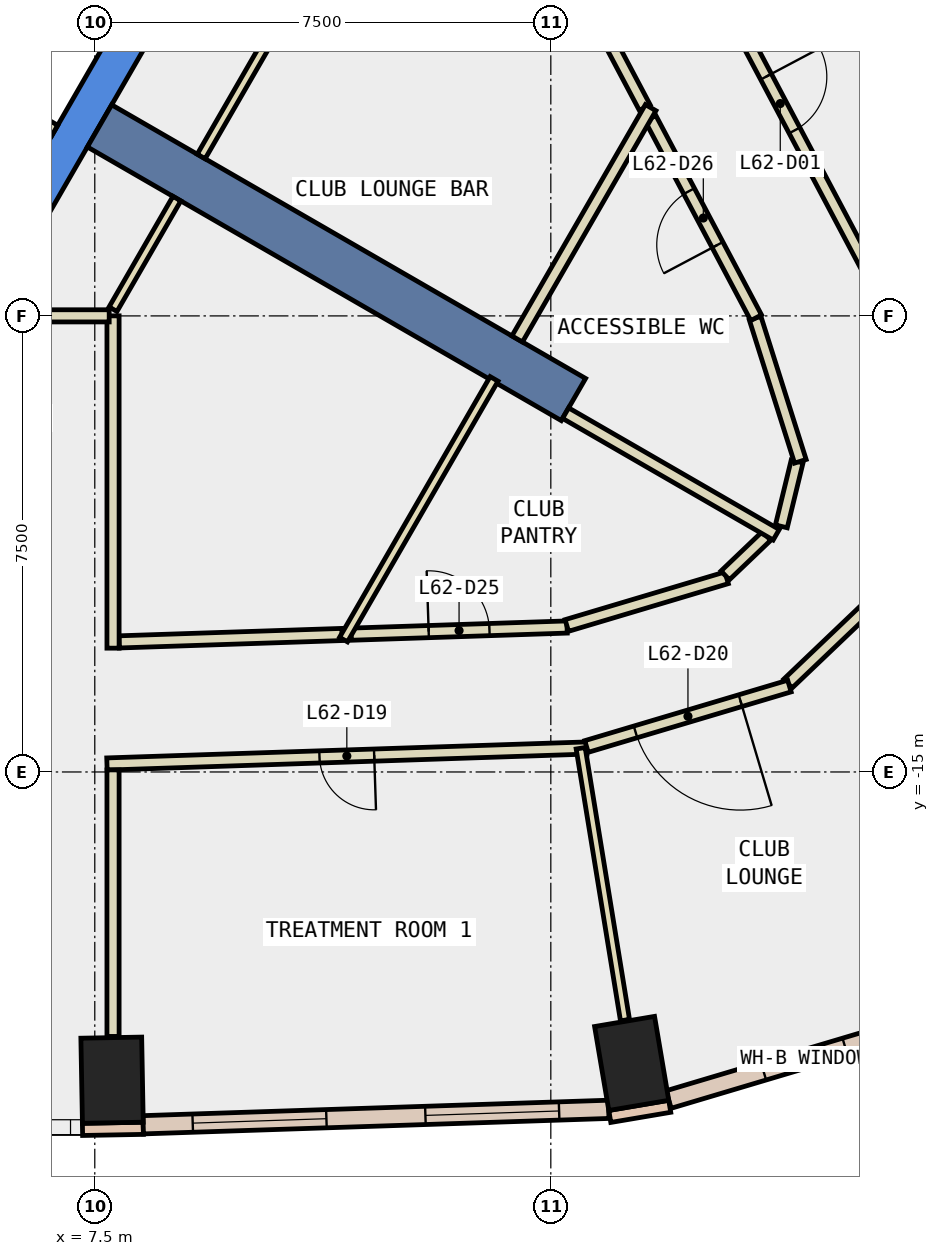
"""IFC4 building model, lengths in metres.
Left out: names, types, materials, properties, quantities, classifications, styles, units other than length and angle.
Written with IfcOpenShell. Run it as: python <this file> out.ifc"""

import sys

from ifc_helpers import new_model, si_unit, direction, frame, frame_2d, origin, origin_2d, place, context, subcontext, project, spatial, polyline, rectangle, outline, extrude, element, fill, save


model = new_model("IFC4")
c1 = context("Model", 3, precision=1e-05, world=origin(), true_north=direction((0.0, 1.0)))
c2 = subcontext(c1, "Body", "Model", "MODEL_VIEW")
j1 = project(units=[si_unit("LENGTHUNIT", "METRE"), si_unit("PLANEANGLEUNIT", "RADIAN")], contexts=[c1])
p1 = place(None, origin())
s1 = spatial("IfcSite", under=j1, at=p1, CompositionType="ELEMENT")
p2 = place(p1, origin())
s2 = spatial("IfcBuilding", under=s1, at=p2, CompositionType="ELEMENT")
p3 = place(p2, frame((0.0, 0.0, 270.2)))
s3 = spatial("IfcBuildingStorey", under=s2, at=p3, CompositionType="ELEMENT", Elevation=270.2)
for number, where, z_axis, x_axis in (
    (1, (7.784, -20.069, -0.34), (0.0, 0.0, 1.0), (1.0, 0.018, 0.0)),
    (2, (16.33, -19.793, -0.34), (0.0, 0.0, 1.0), (0.986, 0.167, 0.0)),
):
    element("IfcColumn", number, at=place(p3, frame(where, z_axis=z_axis, x_axis=x_axis)), inside=s3, PredefinedType="COLUMN", context=c2, shape_type="SweptSolid", body=[
        extrude(rectangle(XDim=1.0, YDim=1.4, at=origin_2d()), origin(), (0.0, 0.0, 1.0), 3.6),
    ])
p4 = place(p3, frame((0.0, 0.0, -0.34)))
e3 = element("IfcWall", 3, at=p4, inside=s3, PredefinedType="SHEAR", context=c2, shape_type="SweptSolid", body=[
    extrude(outline(polyline([(5.774, -7.5), (11.547, 2.5), (10.854, 2.5), (5.427, -6.9), (5.774, -7.5)])), origin(), (0.0, 0.0, 1.0), 3.6),
])
p5 = place(p3, frame((7.578, -4.375, -0.34), z_axis=(0.0, 0.0, 1.0), x_axis=(0.866024315419, -0.5000018851, 0.0)))
e4 = element("IfcWall", 4, at=p5, inside=s3, PredefinedType="SHEAR", context=c2, shape_type="SweptSolid", body=[
    extrude(rectangle(XDim=9.0, YDim=0.8, at=frame_2d((4.5, 0.0))), origin(), (0.0, 0.0, 1.0), 3.6),
])
for number, where, z_axis, x_axis in (
    (5, (7.298, -20.878, 0.0), (0.0, 0.0, 1.0), (1.0, 0.018, 0.0)),
    (6, (15.97, -20.665, 0.0), (0.0, 0.0, 1.0), (0.986, 0.167, 0.0)),
):
    element("IfcWall", number, at=place(p3, frame(where, z_axis=z_axis, x_axis=x_axis)), inside=s3, PredefinedType="STANDARD", context=c2, shape_type="SweptSolid", body=[
        extrude(rectangle(XDim=1.0, YDim=0.2, at=frame_2d((0.5, 0.0))), origin(), (0.0, 0.0, 1.0), 3.26),
    ])
p6 = place(p3, frame((8.296, -20.802, 0.0), z_axis=(0.0, 0.0, 1.0), x_axis=(0.999450376985, 0.033150323459, 0.0)))
e7 = element("IfcWall", 7, at=p6, inside=s3, PredefinedType="STANDARD", context=c2, shape_type="SweptSolid", body=[
    extrude(rectangle(XDim=7.659, YDim=0.3, at=frame_2d((3.83, 0.0))), origin(), (0.0, 0.0, 1.0), 3.26),
])
p7 = place(p6, frame((0.815, 0.0, 0.9)))
e8 = element("IfcOpeningElement", 8, at=p7, cuts=e7, PredefinedType="OPENING", context=c2, shape_type="SweptSolid", body=[
    extrude(rectangle(XDim=2.2, YDim=2.0, at=frame_2d((1.1, 1.0))), frame((0.0, 0.16, 0.0), z_axis=(0.0, -1.0, 0.0), x_axis=(1.0, 0.0, 0.0)), (0.0, 0.0, 1.0), 0.32),
])
p8 = place(p6, frame((4.644, 0.0, 0.9)))
e9 = element("IfcOpeningElement", 9, at=p8, cuts=e7, PredefinedType="OPENING", context=c2, shape_type="SweptSolid", body=[
    extrude(rectangle(XDim=2.2, YDim=2.0, at=frame_2d((1.1, 1.0))), frame((0.0, 0.16, 0.0), z_axis=(0.0, -1.0, 0.0), x_axis=(1.0, 0.0, 0.0)), (0.0, 0.0, 1.0), 0.32),
])
p9 = place(p3, frame((16.937, -20.387, 0.0), z_axis=(0.0, 0.0, 1.0), x_axis=(0.958361270465, 0.285558532131, 0.0)))
e10 = element("IfcWall", 10, at=p9, inside=s3, PredefinedType="STANDARD", context=c2, shape_type="SweptSolid", body=[
    extrude(rectangle(XDim=4.658, YDim=0.3, at=frame_2d((2.329, 0.0))), origin(), (0.0, 0.0, 1.0), 3.26),
])
p10 = place(p9, frame((1.629, 0.0, 0.9)))
e11 = element("IfcOpeningElement", 11, at=p10, cuts=e10, PredefinedType="OPENING", context=c2, shape_type="SweptSolid", body=[
    extrude(rectangle(XDim=1.4, YDim=2.0, at=frame_2d((0.7, 1.0))), frame((0.0, 0.16, 0.0), z_axis=(0.0, -1.0, 0.0), x_axis=(1.0, 0.0, 0.0)), (0.0, 0.0, 1.0), 0.32),
])
p11 = place(p3, frame((7.9, -12.861, 0.0), z_axis=(0.0, 0.0, 1.0), x_axis=(0.999446088303, 0.033279371614, 0.0)))
e12 = element("IfcWall", 12, at=p11, inside=s3, PredefinedType="PARTITIONING", context=c2, shape_type="SweptSolid", body=[
    extrude(rectangle(XDim=3.668, YDim=0.2, at=frame_2d((1.834, 0.0))), origin(), (0.0, 0.0, 1.0), 3.26),
])
p12 = place(p3, frame((16.545, -4.074, 0.0), z_axis=(0.0, 0.0, 1.0), x_axis=(-0.468321873419, 0.883557934081, 0.0)))
e13 = element("IfcWall", 13, at=p12, inside=s3, PredefinedType="PARTITIONING", context=c2, shape_type="SweptSolid", body=[
    extrude(rectangle(XDim=2.093, YDim=0.2, at=frame_2d((1.046, 0.0))), origin(), (0.0, 0.0, 1.0), 3.26),
])
p13 = place(p3, frame((11.716, -12.734, 0.0), z_axis=(0.0, 0.0, 1.0), x_axis=(0.999449093602, 0.03318899362, 0.0)))
e14 = element("IfcWall", 14, at=p13, inside=s3, PredefinedType="PARTITIONING", context=c2, shape_type="SweptSolid", body=[
    extrude(rectangle(XDim=3.553, YDim=0.2, at=frame_2d((1.776, 0.0))), origin(), (0.0, 0.0, 1.0), 3.26),
])
p14 = place(p13, frame((1.276, 0.0, 0.0)))
e15 = element("IfcOpeningElement", 15, at=p14, cuts=e14, PredefinedType="OPENING", context=c2, shape_type="SweptSolid", body=[
    extrude(rectangle(XDim=1.0, YDim=2.1, at=frame_2d((0.5, 1.05))), frame((0.0, 0.11, 0.0), z_axis=(0.0, -1.0, 0.0), x_axis=(1.0, 0.0, 0.0)), (0.0, 0.0, 1.0), 0.22),
])
p15 = place(p3, frame((15.263, -12.591, 0.0), z_axis=(0.0, 0.0, 1.0), x_axis=(0.958253964342, 0.285918414628, 0.0)))
e16 = element("IfcWall", 16, at=p15, inside=s3, PredefinedType="PARTITIONING", context=c2, shape_type="SweptSolid", body=[
    extrude(rectangle(XDim=2.743, YDim=0.2, at=frame_2d((1.371, 0.0))), origin(), (0.0, 0.0, 1.0), 3.26),
])
p16 = place(p3, frame((17.868, -11.767, 0.0), z_axis=(0.0, 0.0, 1.0), x_axis=(0.723402701671, 0.690426340181, 0.0)))
e17 = element("IfcWall", 17, at=p16, inside=s3, PredefinedType="PARTITIONING", context=c2, shape_type="SweptSolid", body=[
    extrude(rectangle(XDim=0.94, YDim=0.2, at=frame_2d((0.47, 0.0))), origin(), (0.0, 0.0, 1.0), 3.26),
])
p17 = place(p3, frame((18.791, -10.961, 0.0), z_axis=(0.0, 0.0, 1.0), x_axis=(0.236572634589, 0.971613806285, 0.0)))
e18 = element("IfcWall", 18, at=p17, inside=s3, PredefinedType="PARTITIONING", context=c2, shape_type="SweptSolid", body=[
    extrude(rectangle(XDim=1.099, YDim=0.2, at=frame_2d((0.55, 0.0))), origin(), (0.0, 0.0, 1.0), 3.26),
])
p18 = place(p3, frame((19.104, -9.891, 0.0), z_axis=(0.0, 0.0, 1.0), x_axis=(-0.301325410186, 0.953521366922, 0.0)))
e19 = element("IfcWall", 19, at=p18, inside=s3, PredefinedType="PARTITIONING", context=c2, shape_type="SweptSolid", body=[
    extrude(rectangle(XDim=2.469, YDim=0.2, at=frame_2d((1.234, 0.0))), origin(), (0.0, 0.0, 1.0), 3.26),
])
p19 = place(p3, frame((18.377, -7.53, 0.0), z_axis=(0.0, 0.0, 1.0), x_axis=(-0.468214048123, 0.883615077474, 0.0)))
e20 = element("IfcWall", 20, at=p19, inside=s3, PredefinedType="PARTITIONING", context=c2, shape_type="SweptSolid", body=[
    extrude(rectangle(XDim=3.712, YDim=0.2, at=frame_2d((1.856, 0.0))), origin(), (0.0, 0.0, 1.0), 3.26),
])
p20 = place(p19, frame((1.356, 0.0, 0.0)))
e21 = element("IfcOpeningElement", 21, at=p20, cuts=e20, PredefinedType="OPENING", context=c2, shape_type="SweptSolid", body=[
    extrude(rectangle(XDim=1.0, YDim=2.1, at=frame_2d((0.5, 1.05))), frame((0.0, 0.11, 0.0), z_axis=(0.0, -1.0, 0.0), x_axis=(1.0, 0.0, 0.0)), (0.0, 0.0, 1.0), 0.22),
])
p21 = place(p3, frame((15.591, -14.606, 0.0), z_axis=(0.0, 0.0, 1.0), x_axis=(-0.999445318732, -0.03330247535, 0.0)))
e22 = element("IfcWall", 22, at=p21, inside=s3, PredefinedType="PARTITIONING", context=c2, shape_type="SweptSolid", body=[
    extrude(rectangle(XDim=7.896, YDim=0.2, at=frame_2d((3.948, 0.0))), origin(), (0.0, 0.0, 1.0), 3.26),
])
p22 = place(p21, frame((3.498, 0.0, 0.0)))
e23 = element("IfcOpeningElement", 23, at=p22, cuts=e22, PredefinedType="OPENING", context=c2, shape_type="SweptSolid", body=[
    extrude(rectangle(XDim=0.9, YDim=2.1, at=frame_2d((0.45, 1.05))), frame((0.0, 0.11, 0.0), z_axis=(0.0, -1.0, 0.0), x_axis=(1.0, 0.0, 0.0)), (0.0, 0.0, 1.0), 0.22),
])
p23 = place(p3, frame((20.692, -11.837, 0.0), z_axis=(0.0, 0.0, 1.0), x_axis=(-0.723668833869, -0.690147389248, 0.0)))
e24 = element("IfcWall", 24, at=p23, inside=s3, PredefinedType="PARTITIONING", context=c2, shape_type="SweptSolid", body=[
    extrude(rectangle(XDim=2.476, YDim=0.2, at=frame_2d((1.238, 0.0))), origin(), (0.0, 0.0, 1.0), 3.26),
])
p24 = place(p3, frame((18.924, -13.587, 0.0), z_axis=(0.0, 0.0, 1.0), x_axis=(-0.958378336681, -0.285501250052, 0.0)))
e25 = element("IfcWall", 25, at=p24, inside=s3, PredefinedType="PARTITIONING", context=c2, shape_type="SweptSolid", body=[
    extrude(rectangle(XDim=3.482, YDim=0.2, at=frame_2d((1.741, 0.0))), origin(), (0.0, 0.0, 1.0), 3.26),
])
p25 = place(p24, frame((0.841, 0.0, 0.0)))
e26 = element("IfcOpeningElement", 26, at=p25, cuts=e25, PredefinedType="OPENING", context=c2, shape_type="SweptSolid", body=[
    extrude(rectangle(XDim=1.8, YDim=2.1, at=frame_2d((0.9, 1.05))), frame((0.0, 0.11, 0.0), z_axis=(0.0, -1.0, 0.0), x_axis=(1.0, 0.0, 0.0)), (0.0, 0.0, 1.0), 0.22),
])
p26 = place(p3, frame((17.318, -1.262, 0.0), z_axis=(0.0, 0.0, 1.0), x_axis=(0.468313568794, -0.883562335822, 0.0)))
e27 = element("IfcWall", 27, at=p26, inside=s3, PredefinedType="PARTITIONING", context=c2, shape_type="SweptSolid", body=[
    extrude(rectangle(XDim=6.216, YDim=0.2, at=frame_2d((3.108, 0.0))), origin(), (0.0, 0.0, 1.0), 3.26),
])
p27 = place(p26, frame((2.608, 0.0, 0.0)))
e28 = element("IfcOpeningElement", 28, at=p27, cuts=e27, PredefinedType="OPENING", context=c2, shape_type="SweptSolid", body=[
    extrude(rectangle(XDim=1.0, YDim=2.1, at=frame_2d((0.5, 1.05))), frame((0.0, 0.11, 0.0), z_axis=(0.0, -1.0, 0.0), x_axis=(1.0, 0.0, 0.0)), (0.0, 0.0, 1.0), 0.22),
])
p28 = place(p3, frame((5.751, -3.938, 0.0), z_axis=(0.0, 0.0, 1.0), x_axis=(0.500034260056, 0.866005622828, 0.0)))
e29 = element("IfcWall", 29, at=p28, inside=s3, PredefinedType="PARTITIONING", context=c2, shape_type="SweptSolid", body=[
    extrude(rectangle(XDim=5.399, YDim=0.2, at=frame_2d((2.7, 0.0))), origin(), (0.0, 0.0, 1.0), 3.26),
])
p29 = place(p3, frame((6.841, -4.452, 0.0), z_axis=(0.0, 0.0, 1.0), x_axis=(-0.86621513555, 0.499671230855, 0.0)))
e30 = element("IfcWall", 30, at=p29, inside=s3, PredefinedType="PARTITIONING", context=c2, shape_type="SweptSolid", body=[
    extrude(rectangle(XDim=1.1, YDim=0.2, at=frame_2d((0.55, 0.0))), origin(), (0.0, 0.0, 1.0), 3.26),
])
p30 = place(p3, frame((7.8, -7.39, 0.0), z_axis=(0.0, 0.0, 1.0), x_axis=(0.499977374825, 0.866038466041, 0.0)))
e31 = element("IfcWall", 31, at=p30, inside=s3, PredefinedType="PARTITIONING", context=c2, shape_type="SweptSolid", body=[
    extrude(rectangle(XDim=2.1, YDim=0.15, at=frame_2d((1.05, 0.0))), origin(), (0.0, 0.0, 1.0), 3.26),
])
p31 = place(p3, frame((7.8, -7.499, 0.0), z_axis=(0.0, 0.0, 1.0), x_axis=(0.0, -1.0, 0.0)))
e32 = element("IfcWall", 32, at=p31, inside=s3, PredefinedType="PARTITIONING", context=c2, shape_type="SweptSolid", body=[
    extrude(rectangle(XDim=5.465, YDim=0.2, at=frame_2d((2.732, 0.0))), origin(), (0.0, 0.0, 1.0), 3.26),
])
p32 = place(p3, frame((7.8, -14.966, 0.0), z_axis=(0.0, 0.0, 1.0), x_axis=(0.0, -1.0, 0.0)))
e33 = element("IfcWall", 33, at=p32, inside=s3, PredefinedType="PARTITIONING", context=c2, shape_type="SweptSolid", body=[
    extrude(rectangle(XDim=4.383, YDim=0.2, at=frame_2d((2.191, 0.0))), origin(), (0.0, 0.0, 1.0), 3.26),
])
p33 = place(p3, frame((14.067, -8.536, 0.0), z_axis=(0.0, 0.0, 1.0), x_axis=(-0.500100941679, -0.865967117235, 0.0)))
e34 = element("IfcWall", 34, at=p33, inside=s3, PredefinedType="PARTITIONING", context=c2, shape_type="SweptSolid", body=[
    extrude(rectangle(XDim=4.951, YDim=0.15, at=frame_2d((2.475, 0.0))), origin(), (0.0, 0.0, 1.0), 3.26),
])
p34 = place(p3, frame((16.642, -4.075, 0.0), z_axis=(0.0, 0.0, 1.0), x_axis=(-0.49980426207, -0.866138383641, 0.0)))
e35 = element("IfcWall", 35, at=p34, inside=s3, PredefinedType="PARTITIONING", context=c2, shape_type="SweptSolid", body=[
    extrude(rectangle(XDim=4.392, YDim=0.2, at=frame_2d((2.196, 0.0))), origin(), (0.0, 0.0, 1.0), 3.26),
])
p35 = place(p3, frame((15.243, -9.099, 0.0), z_axis=(0.0, 0.0, 1.0), x_axis=(0.866026010844, -0.49999894854, 0.0)))
e36 = element("IfcWall", 36, at=p35, inside=s3, PredefinedType="PARTITIONING", context=c2, shape_type="SweptSolid", body=[
    extrude(rectangle(XDim=4.0, YDim=0.2, at=frame_2d((2.0, 0.0))), origin(), (0.0, 0.0, 1.0), 3.26),
])
p36 = place(p3, frame((15.491, -14.61, 0.0), z_axis=(0.0, 0.0, 1.0), x_axis=(0.160928343418, -0.986966092774, 0.0)))
e37 = element("IfcWall", 37, at=p36, inside=s3, PredefinedType="PARTITIONING", context=c2, shape_type="SweptSolid", body=[
    extrude(rectangle(XDim=4.53, YDim=0.15, at=frame_2d((2.265, 0.0))), origin(), (0.0, 0.0, 1.0), 3.26),
])
p37 = place(p3, frame((9.25, -4.878, 0.0), z_axis=(0.0, 0.0, 1.0), x_axis=(0.499982416899, 0.866035555154, 0.0)))
e38 = element("IfcWall", 38, at=p37, inside=s3, PredefinedType="PARTITIONING", context=c2, shape_type="SweptSolid", body=[
    extrude(rectangle(XDim=8.048, YDim=0.15, at=frame_2d((4.024, 0.0))), origin(), (0.0, 0.0, 1.0), 3.26),
])
p38 = place(p3, frame((5.944, -7.499, 0.0), z_axis=(0.0, 0.0, 1.0), x_axis=(1.0, 0.0, 0.0)))
e39 = element("IfcWall", 39, at=p38, inside=s3, PredefinedType="PARTITIONING", context=c2, shape_type="SweptSolid", body=[
    extrude(rectangle(XDim=1.793, YDim=0.2, at=frame_2d((0.896, 0.0))), origin(), (0.0, 0.0, 1.0), 3.26),
])
p39 = place(p3, frame((5.492, -3.788, 0.0), z_axis=(0.0, 0.0, 1.0), x_axis=(0.500034260056, 0.866005622828, 0.0)))
e40 = element("IfcWall", 40, at=p39, inside=s3, PredefinedType="STANDARD", context=c2, shape_type="SweptSolid", body=[
    extrude(rectangle(XDim=5.399, YDim=0.2, at=frame_2d((2.7, 0.0))), origin(), (0.0, 0.0, 1.0), 3.26),
])
p40 = place(p7, origin())
e41 = element("IfcWindow", 41, at=p40, inside=s3, PartitioningType="SINGLE_PANEL", PredefinedType="WINDOW", context=c2, shape_type="SweptSolid", body=[
    extrude(rectangle(XDim=2.2, YDim=2.0, at=frame_2d((1.1, 1.0))), frame((0.0, 0.03, 0.0), z_axis=(0.0, -1.0, 0.0), x_axis=(1.0, 0.0, 0.0)), (0.0, 0.0, 1.0), 0.06),
])
fill(e8, e41)
p41 = place(p8, origin())
e42 = element("IfcWindow", 42, at=p41, inside=s3, PartitioningType="SINGLE_PANEL", PredefinedType="WINDOW", context=c2, shape_type="SweptSolid", body=[
    extrude(rectangle(XDim=2.2, YDim=2.0, at=frame_2d((1.1, 1.0))), frame((0.0, 0.03, 0.0), z_axis=(0.0, -1.0, 0.0), x_axis=(1.0, 0.0, 0.0)), (0.0, 0.0, 1.0), 0.06),
])
fill(e9, e42)
p42 = place(p10, origin())
e43 = element("IfcWindow", 43, at=p42, inside=s3, PartitioningType="SINGLE_PANEL", PredefinedType="WINDOW", context=c2, shape_type="SweptSolid", body=[
    extrude(rectangle(XDim=1.4, YDim=2.0, at=frame_2d((0.7, 1.0))), frame((0.0, 0.03, 0.0), z_axis=(0.0, -1.0, 0.0), x_axis=(1.0, 0.0, 0.0)), (0.0, 0.0, 1.0), 0.06),
])
fill(e11, e43)
p43 = place(p27, origin())
e44 = element("IfcDoor", 44, at=p43, inside=s3, OperationType="SINGLE_SWING_LEFT", PredefinedType="DOOR", context=c2, shape_type="SweptSolid", body=[
    extrude(rectangle(XDim=1.0, YDim=2.1, at=frame_2d((0.5, 1.05))), frame((0.0, 0.025, 0.0), z_axis=(0.0, -1.0, 0.0), x_axis=(1.0, 0.0, 0.0)), (0.0, 0.0, 1.0), 0.05),
])
fill(e28, e44)
p44 = place(p22, origin())
e45 = element("IfcDoor", 45, at=p44, inside=s3, OperationType="SINGLE_SWING_LEFT", PredefinedType="DOOR", context=c2, shape_type="SweptSolid", body=[
    extrude(rectangle(XDim=0.9, YDim=2.1, at=frame_2d((0.45, 1.05))), frame((0.0, 0.025, 0.0), z_axis=(0.0, -1.0, 0.0), x_axis=(1.0, 0.0, 0.0)), (0.0, 0.0, 1.0), 0.05),
])
fill(e23, e45)
p45 = place(p25, origin())
e46 = element("IfcDoor", 46, at=p45, inside=s3, OperationType="DOUBLE_DOOR_SINGLE_SWING", PredefinedType="DOOR", context=c2, shape_type="SweptSolid", body=[
    extrude(rectangle(XDim=1.8, YDim=2.1, at=frame_2d((0.9, 1.05))), frame((0.0, 0.025, 0.0), z_axis=(0.0, -1.0, 0.0), x_axis=(1.0, 0.0, 0.0)), (0.0, 0.0, 1.0), 0.05),
])
fill(e26, e46)
p46 = place(p14, origin())
e47 = element("IfcDoor", 47, at=p46, inside=s3, OperationType="SINGLE_SWING_LEFT", PredefinedType="DOOR", context=c2, shape_type="SweptSolid", body=[
    extrude(rectangle(XDim=1.0, YDim=2.1, at=frame_2d((0.5, 1.05))), frame((0.0, 0.025, 0.0), z_axis=(0.0, -1.0, 0.0), x_axis=(1.0, 0.0, 0.0)), (0.0, 0.0, 1.0), 0.05),
])
fill(e15, e47)
p47 = place(p20, origin())
e48 = element("IfcDoor", 48, at=p47, inside=s3, OperationType="SINGLE_SWING_RIGHT", PredefinedType="DOOR", context=c2, shape_type="SweptSolid", body=[
    extrude(rectangle(XDim=1.0, YDim=2.1, at=frame_2d((0.5, 1.05))), frame((0.0, 0.025, 0.0), z_axis=(0.0, -1.0, 0.0), x_axis=(1.0, 0.0, 0.0)), (0.0, 0.0, 1.0), 0.05),
])
fill(e21, e48)
save(model, sys.argv[1])
